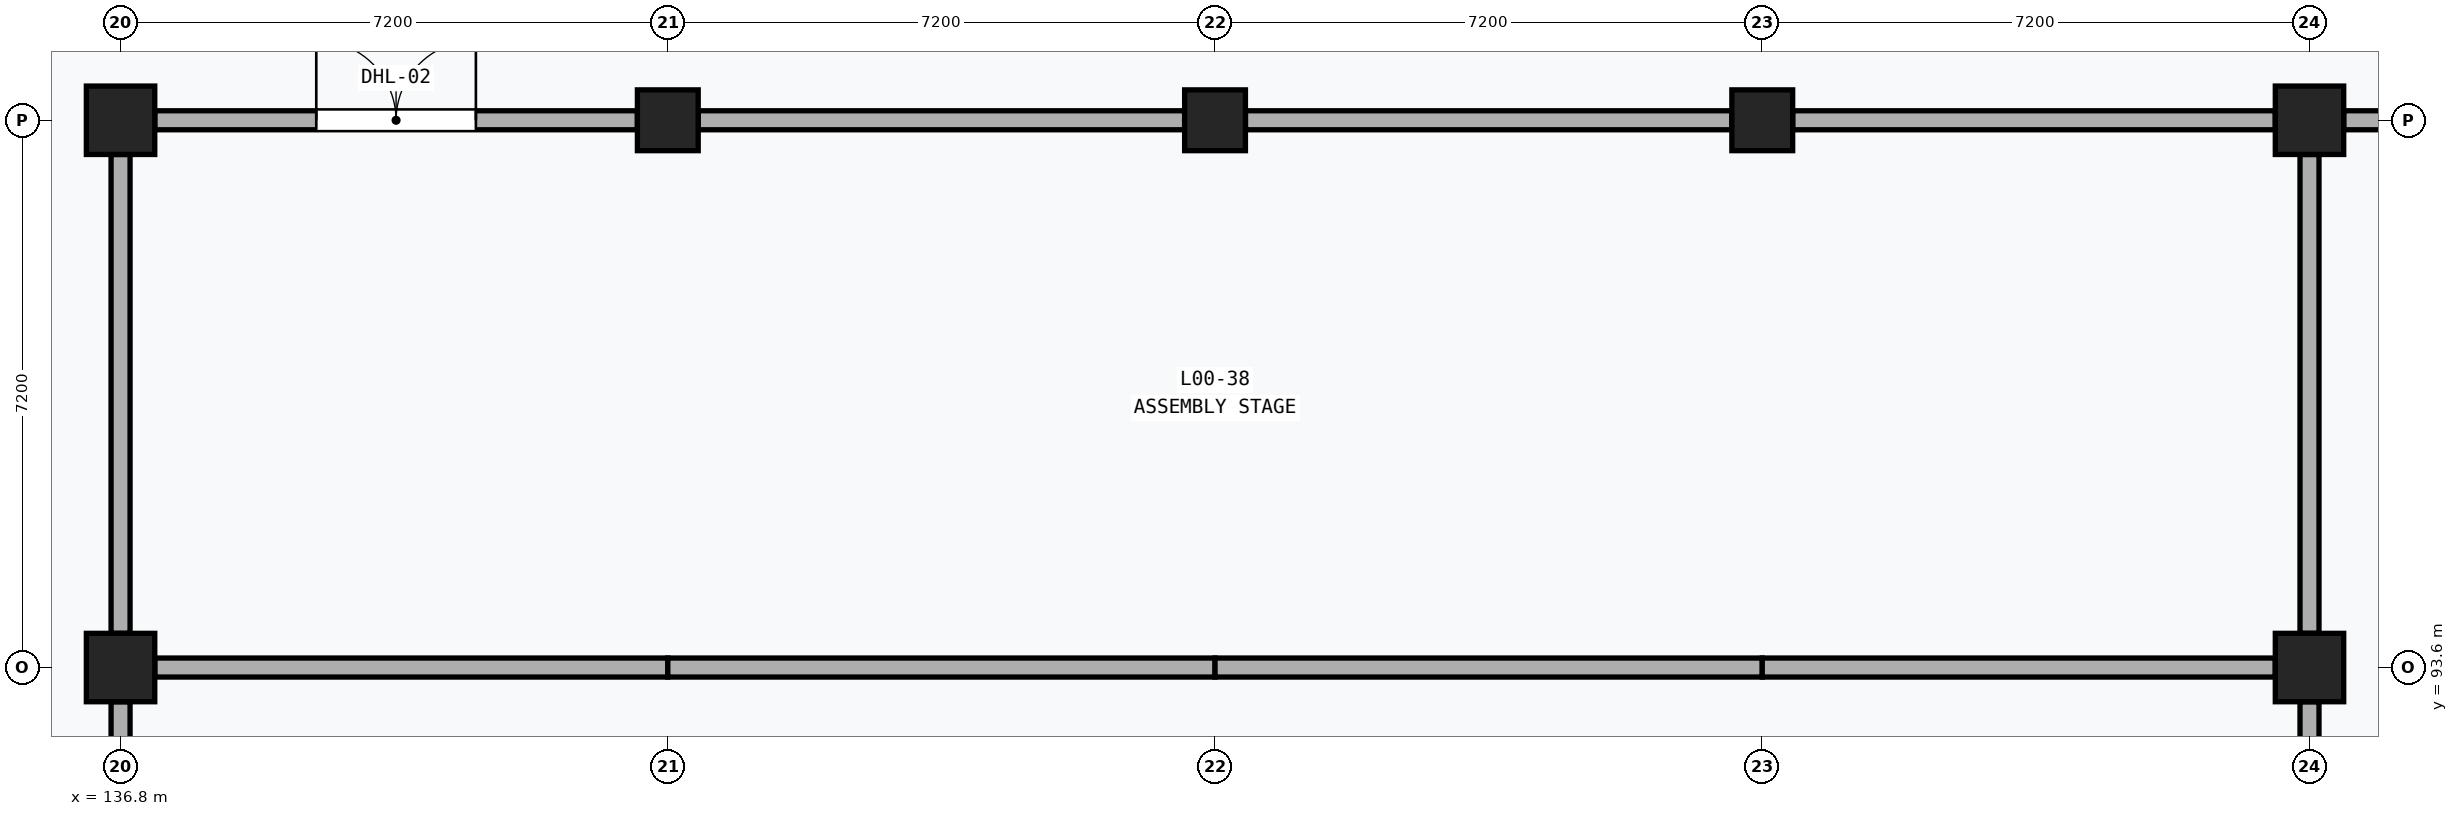
"""IFC4 building model, lengths in metres.
Left out: names, types, materials, properties, quantities, classifications, styles, units other than length and angle.
Written with IfcOpenShell. Run it as: python <this file> out.ifc"""

import sys

from ifc_helpers import new_model, si_unit, direction, frame, frame_2d, origin, origin_2d, place, context, subcontext, project, spatial, rectangle, extrude, element, fill, save


model = new_model("IFC4")
c1 = context("Model", 3, precision=1e-05, world=origin(), true_north=direction((0.0, 1.0)))
c2 = subcontext(c1, "Body", "Model", "MODEL_VIEW")
j1 = project(units=[si_unit("LENGTHUNIT", "METRE"), si_unit("PLANEANGLEUNIT", "RADIAN")], contexts=[c1])
p1 = place(None, origin())
s1 = spatial("IfcSite", under=j1, at=p1, CompositionType="ELEMENT")
p2 = place(p1, origin())
s2 = spatial("IfcBuilding", under=s1, at=p2, CompositionType="ELEMENT")
p3 = place(p2, origin())
s3 = spatial("IfcBuildingStorey", under=s2, at=p3, CompositionType="ELEMENT", Elevation=0.0)
for number, where, z_axis, x_axis in (
    (1, (136.8, 93.6, 0.0), (0.0, 0.0, 1.0), (1.0, 0.0, 0.0)),
    (2, (136.8, 100.8, 0.0), (0.0, 0.0, 1.0), (1.0, 0.0, 0.0)),
):
    element("IfcColumn", number, at=place(p3, frame(where, z_axis=z_axis, x_axis=x_axis)), inside=s3, PredefinedType="COLUMN", context=c2, shape_type="SweptSolid", body=[
        extrude(rectangle(XDim=0.9, YDim=0.9, at=origin_2d()), origin(), (0.0, 0.0, 1.0), 4.8),
    ])
for number, where, z_axis, x_axis in (
    (3, (144.0, 100.8, 0.0), (0.0, 0.0, 1.0), (1.0, 0.0, 0.0)),
    (4, (151.2, 100.8, 0.0), (0.0, 0.0, 1.0), (1.0, 0.0, 0.0)),
    (5, (158.4, 100.8, 0.0), (0.0, 0.0, 1.0), (1.0, 0.0, 0.0)),
):
    element("IfcColumn", number, at=place(p3, frame(where, z_axis=z_axis, x_axis=x_axis)), inside=s3, PredefinedType="COLUMN", context=c2, shape_type="SweptSolid", body=[
        extrude(rectangle(XDim=0.8, YDim=0.8, at=origin_2d()), origin(), (0.0, 0.0, 1.0), 4.8),
    ])
for number, where, z_axis, x_axis in (
    (6, (165.6, 93.6, 0.0), (0.0, 0.0, 1.0), (1.0, 0.0, 0.0)),
    (7, (165.6, 100.8, 0.0), (0.0, 0.0, 1.0), (1.0, 0.0, 0.0)),
):
    element("IfcColumn", number, at=place(p3, frame(where, z_axis=z_axis, x_axis=x_axis)), inside=s3, PredefinedType="COLUMN", context=c2, shape_type="SweptSolid", body=[
        extrude(rectangle(XDim=0.9, YDim=0.9, at=origin_2d()), origin(), (0.0, 0.0, 1.0), 4.8),
    ])
p4 = place(p3, frame((137.25, 93.6, 0.0), z_axis=(0.0, 0.0, 1.0), x_axis=(1.0, 0.0, 0.0)))
e8 = element("IfcWall", 8, at=p4, inside=s3, PredefinedType="PARTITIONING", context=c2, shape_type="SweptSolid", body=[
    extrude(rectangle(XDim=6.75, YDim=0.25, at=frame_2d((3.375, 0.0))), origin(), (0.0, 0.0, 1.0), 4.47),
])
p5 = place(p3, frame((136.8, 86.85, 0.0), z_axis=(0.0, 0.0, 1.0), x_axis=(0.0, 1.0, 0.0)))
e9 = element("IfcWall", 9, at=p5, inside=s3, PredefinedType="PARTITIONING", context=c2, shape_type="SweptSolid", body=[
    extrude(rectangle(XDim=6.3, YDim=0.25, at=frame_2d((3.15, 0.0))), origin(), (0.0, 0.0, 1.0), 3.62),
])
for number, where, z_axis, x_axis in (
    (10, (144.0, 93.6, 0.0), (0.0, 0.0, 1.0), (1.0, 0.0, 0.0)),
    (11, (151.2, 93.6, 0.0), (0.0, 0.0, 1.0), (1.0, 0.0, 0.0)),
):
    element("IfcWall", number, at=place(p3, frame(where, z_axis=z_axis, x_axis=x_axis)), inside=s3, PredefinedType="PARTITIONING", context=c2, shape_type="SweptSolid", body=[
        extrude(rectangle(XDim=7.2, YDim=0.25, at=frame_2d((3.6, 0.0))), origin(), (0.0, 0.0, 1.0), 4.47),
    ])
p6 = place(p3, frame((158.4, 93.6, 0.0), z_axis=(0.0, 0.0, 1.0), x_axis=(1.0, 0.0, 0.0)))
e12 = element("IfcWall", 12, at=p6, inside=s3, PredefinedType="PARTITIONING", context=c2, shape_type="SweptSolid", body=[
    extrude(rectangle(XDim=6.75, YDim=0.25, at=frame_2d((3.375, 0.0))), origin(), (0.0, 0.0, 1.0), 4.47),
])
p7 = place(p3, frame((165.6, 86.85, 0.0), z_axis=(0.0, 0.0, 1.0), x_axis=(0.0, 1.0, 0.0)))
e13 = element("IfcWall", 13, at=p7, inside=s3, PredefinedType="PARTITIONING", context=c2, shape_type="SweptSolid", body=[
    extrude(rectangle(XDim=6.3, YDim=0.25, at=frame_2d((3.15, 0.0))), origin(), (0.0, 0.0, 1.0), 3.62),
])
p8 = place(p3, frame((137.25, 100.8, 0.0), z_axis=(0.0, 0.0, 1.0), x_axis=(1.0, 0.0, 0.0)))
e14 = element("IfcWall", 14, at=p8, inside=s3, PredefinedType="PARTITIONING", context=c2, shape_type="SweptSolid", body=[
    extrude(rectangle(XDim=6.35, YDim=0.25, at=frame_2d((3.175, 0.0))), origin(), (0.0, 0.0, 1.0), 3.62),
])
p9 = place(p8, frame((2.125, 0.0, 0.0)))
e15 = element("IfcOpeningElement", 15, at=p9, cuts=e14, PredefinedType="OPENING", context=c2, shape_type="SweptSolid", body=[
    extrude(rectangle(XDim=2.1, YDim=2.4, at=frame_2d((1.05, 1.2))), frame((0.0, 0.137, 0.0), z_axis=(0.0, -1.0, 0.0), x_axis=(1.0, 0.0, 0.0)), (0.0, 0.0, 1.0), 0.274),
])
p10 = place(p3, frame((136.8, 94.05, 0.0), z_axis=(0.0, 0.0, 1.0), x_axis=(0.0, 1.0, 0.0)))
e16 = element("IfcWall", 16, at=p10, inside=s3, PredefinedType="PARTITIONING", context=c2, shape_type="SweptSolid", body=[
    extrude(rectangle(XDim=6.3, YDim=0.25, at=frame_2d((3.15, 0.0))), origin(), (0.0, 0.0, 1.0), 3.62),
])
p11 = place(p3, frame((144.4, 100.8, 0.0), z_axis=(0.0, 0.0, 1.0), x_axis=(1.0, 0.0, 0.0)))
e17 = element("IfcWall", 17, at=p11, inside=s3, PredefinedType="PARTITIONING", context=c2, shape_type="SweptSolid", body=[
    extrude(rectangle(XDim=6.4, YDim=0.25, at=frame_2d((3.2, 0.0))), origin(), (0.0, 0.0, 1.0), 3.62),
])
p12 = place(p3, frame((151.6, 100.8, 0.0), z_axis=(0.0, 0.0, 1.0), x_axis=(1.0, 0.0, 0.0)))
e18 = element("IfcWall", 18, at=p12, inside=s3, PredefinedType="PARTITIONING", context=c2, shape_type="SweptSolid", body=[
    extrude(rectangle(XDim=6.4, YDim=0.25, at=frame_2d((3.2, 0.0))), origin(), (0.0, 0.0, 1.0), 3.62),
])
p13 = place(p3, frame((158.8, 100.8, 0.0), z_axis=(0.0, 0.0, 1.0), x_axis=(1.0, 0.0, 0.0)))
e19 = element("IfcWall", 19, at=p13, inside=s3, PredefinedType="PARTITIONING", context=c2, shape_type="SweptSolid", body=[
    extrude(rectangle(XDim=6.35, YDim=0.25, at=frame_2d((3.175, 0.0))), origin(), (0.0, 0.0, 1.0), 3.62),
])
p14 = place(p3, frame((165.6, 94.05, 0.0), z_axis=(0.0, 0.0, 1.0), x_axis=(0.0, 1.0, 0.0)))
e20 = element("IfcWall", 20, at=p14, inside=s3, PredefinedType="PARTITIONING", context=c2, shape_type="SweptSolid", body=[
    extrude(rectangle(XDim=6.3, YDim=0.25, at=frame_2d((3.15, 0.0))), origin(), (0.0, 0.0, 1.0), 3.62),
])
p15 = place(p3, frame((166.05, 100.8, 0.0), z_axis=(0.0, 0.0, 1.0), x_axis=(1.0, 0.0, 0.0)))
e21 = element("IfcWall", 21, at=p15, inside=s3, PredefinedType="PARTITIONING", context=c2, shape_type="SweptSolid", body=[
    extrude(rectangle(XDim=6.35, YDim=0.25, at=frame_2d((3.175, 0.0))), origin(), (0.0, 0.0, 1.0), 3.62),
])
p16 = place(p15, frame((2.225, 0.0, 0.0)))
e22 = element("IfcOpeningElement", 22, at=p16, cuts=e21, PredefinedType="OPENING", context=c2, shape_type="SweptSolid", body=[
    extrude(rectangle(XDim=1.9, YDim=2.35, at=frame_2d((0.95, 1.175))), frame((0.0, 0.137, 0.0), z_axis=(0.0, -1.0, 0.0), x_axis=(1.0, 0.0, 0.0)), (0.0, 0.0, 1.0), 0.274),
])
p17 = place(p9, origin())
e23 = element("IfcDoor", 23, at=p17, inside=s3, OperationType="DOUBLE_DOOR_SINGLE_SWING", PredefinedType="DOOR", context=c2, shape_type="SweptSolid", body=[
    extrude(rectangle(XDim=2.1, YDim=2.4, at=frame_2d((1.05, 1.2))), frame((0.0, 0.025, 0.0), z_axis=(0.0, -1.0, 0.0), x_axis=(1.0, 0.0, 0.0)), (0.0, 0.0, 1.0), 0.05),
])
fill(e15, e23)
save(model, sys.argv[1])
